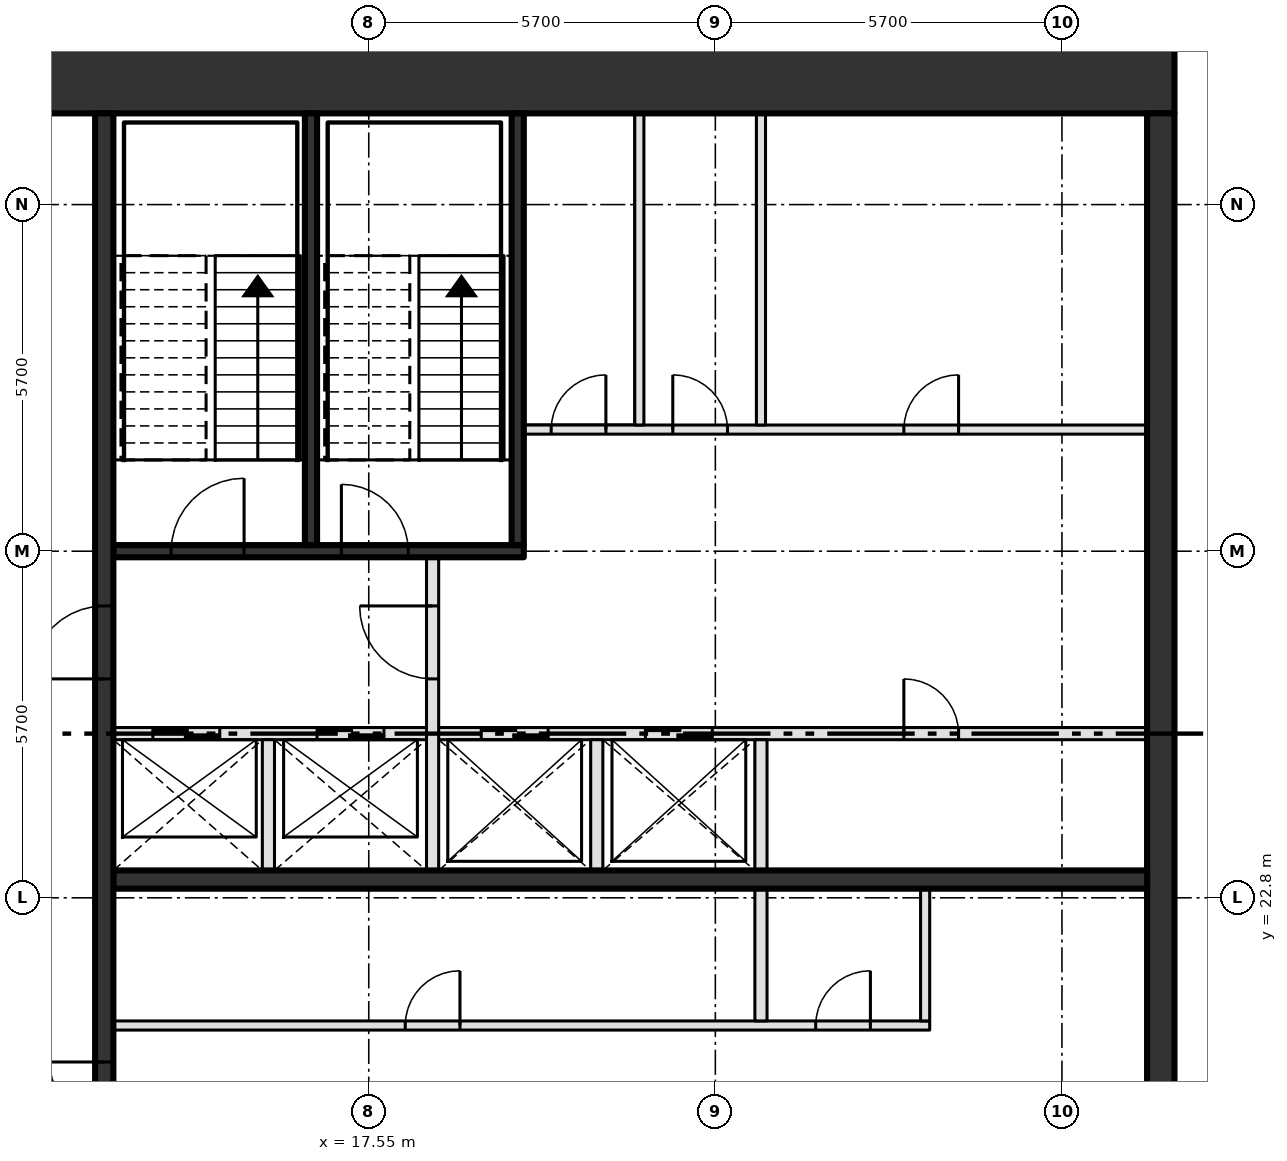
"""IFC4 building model, lengths in metres.
Left out: names, types, materials, properties, quantities, classifications, styles, units other than length and angle.
Written with IfcOpenShell. Run it as: python <this file> out.ifc"""

import sys

from ifc_helpers import new_model, si_unit, direction, frame, frame_2d, origin, place, context, subcontext, project, spatial, rectangle, extrude, element, fill, save


model = new_model("IFC4")
c1 = context("Model", 3, precision=1e-05, world=origin(), true_north=direction((0.0, 1.0)))
c2 = subcontext(c1, "Body", "Model", "MODEL_VIEW")
j1 = project(units=[si_unit("LENGTHUNIT", "METRE"), si_unit("PLANEANGLEUNIT", "RADIAN")], contexts=[c1])
p1 = place(None, origin())
s1 = spatial("IfcSite", under=j1, at=p1, CompositionType="ELEMENT")
p2 = place(p1, origin())
s2 = spatial("IfcBuilding", under=s1, at=p2, CompositionType="ELEMENT")
p3 = place(p2, frame((0.0, 0.0, 409.8)))
s3 = spatial("IfcBuildingStorey", under=s2, at=p3, CompositionType="ELEMENT", Elevation=409.8)
p4 = place(p3, frame((8.0, 36.3, -0.45), z_axis=(0.0, 0.0, 1.0), x_axis=(1.0, 0.0, 0.0)))
e1 = element("IfcWall", 1, at=p4, inside=s3, PredefinedType="SHEAR", context=c2, shape_type="SweptSolid", body=[
    extrude(rectangle(XDim=22.8, YDim=1.2, at=frame_2d((11.4, 0.0))), origin(), (0.0, 0.0, 1.0), 4.95),
])
p5 = place(p4, frame((2.3, 0.0, 0.45)))
e2 = element("IfcOpeningElement", 2, at=p5, cuts=e1, PredefinedType="OPENING", context=c2, shape_type="SweptSolid", body=[
    extrude(rectangle(XDim=1.8, YDim=2.1, at=frame_2d((0.9, 1.05))), frame((0.0, 0.61, 0.0), z_axis=(0.0, -1.0, 0.0), x_axis=(1.0, 0.0, 0.0)), (0.0, 0.0, 1.0), 1.22),
])
p6 = place(p3, frame((30.575, 14.55, -0.45), z_axis=(0.0, 0.0, 1.0), x_axis=(0.0, 1.0, 0.0)))
e3 = element("IfcWall", 3, at=p6, inside=s3, PredefinedType="SHEAR", context=c2, shape_type="SweptSolid", body=[
    extrude(rectangle(XDim=21.15, YDim=0.45, at=frame_2d((10.575, 0.0))), origin(), (0.0, 0.0, 1.0), 4.95),
])
p7 = place(p3, frame((13.35, 20.7, 0.0), z_axis=(0.0, 0.0, 1.0), x_axis=(1.0, 0.0, 0.0)))
e4 = element("IfcWall", 4, at=p7, inside=s3, PredefinedType="PARTITIONING", context=c2, shape_type="SweptSolid", body=[
    extrude(rectangle(XDim=13.425, YDim=0.15, at=frame_2d((6.712, 0.0))), origin(), (0.0, 0.0, 1.0), 4.5),
])
p8 = place(p7, frame((4.8, 0.0, 0.0)))
e5 = element("IfcOpeningElement", 5, at=p8, cuts=e4, PredefinedType="OPENING", context=c2, shape_type="SweptSolid", body=[
    extrude(rectangle(XDim=0.9, YDim=2.1, at=frame_2d((0.45, 1.05))), frame((0.0, 0.085, 0.0), z_axis=(0.0, -1.0, 0.0), x_axis=(1.0, 0.0, 0.0)), (0.0, 0.0, 1.0), 0.17),
])
p9 = place(p7, frame((11.55, 0.0, 0.0)))
e6 = element("IfcOpeningElement", 6, at=p9, cuts=e4, PredefinedType="OPENING", context=c2, shape_type="SweptSolid", body=[
    extrude(rectangle(XDim=0.9, YDim=2.1, at=frame_2d((0.45, 1.05))), frame((0.0, 0.085, 0.0), z_axis=(0.0, -1.0, 0.0), x_axis=(1.0, 0.0, 0.0)), (0.0, 0.0, 1.0), 0.17),
])
p10 = place(p3, frame((13.35, 23.1, 0.0), z_axis=(0.0, 0.0, 1.0), x_axis=(1.0, 0.0, 0.0)))
e7 = element("IfcWall", 7, at=p10, inside=s3, PredefinedType="SHEAR", context=c2, shape_type="SweptSolid", body=[
    extrude(rectangle(XDim=17.0, YDim=0.3, at=frame_2d((8.5, 0.0))), origin(), (0.0, 0.0, 1.0), 4.5),
])
p11 = place(p3, frame((13.35, 25.5, 0.0), z_axis=(0.0, 0.0, 1.0), x_axis=(1.0, 0.0, 0.0)))
e8 = element("IfcWall", 8, at=p11, inside=s3, PredefinedType="SOLIDWALL", context=c2, shape_type="SweptSolid", body=[
    extrude(rectangle(XDim=17.0, YDim=0.2, at=frame_2d((8.5, 0.0))), origin(), (0.0, 0.0, 1.0), 4.5),
])
p12 = place(p11, frame((0.65, 0.0, 0.0)))
e9 = element("IfcOpeningElement", 9, at=p12, cuts=e8, PredefinedType="OPENING", context=c2, shape_type="SweptSolid", body=[
    extrude(rectangle(XDim=1.1, YDim=2.1, at=frame_2d((0.55, 1.05))), frame((0.0, 0.11, 0.0), z_axis=(0.0, -1.0, 0.0), x_axis=(1.0, 0.0, 0.0)), (0.0, 0.0, 1.0), 0.22),
])
p13 = place(p11, frame((3.35, 0.0, 0.0)))
e10 = element("IfcOpeningElement", 10, at=p13, cuts=e8, PredefinedType="OPENING", context=c2, shape_type="SweptSolid", body=[
    extrude(rectangle(XDim=1.1, YDim=2.1, at=frame_2d((0.55, 1.05))), frame((0.0, 0.11, 0.0), z_axis=(0.0, -1.0, 0.0), x_axis=(1.0, 0.0, 0.0)), (0.0, 0.0, 1.0), 0.22),
])
p14 = place(p11, frame((6.05, 0.0, 0.0)))
e11 = element("IfcOpeningElement", 11, at=p14, cuts=e8, PredefinedType="OPENING", context=c2, shape_type="SweptSolid", body=[
    extrude(rectangle(XDim=1.1, YDim=2.1, at=frame_2d((0.55, 1.05))), frame((0.0, 0.11, 0.0), z_axis=(0.0, -1.0, 0.0), x_axis=(1.0, 0.0, 0.0)), (0.0, 0.0, 1.0), 0.22),
])
p15 = place(p11, frame((8.75, 0.0, 0.0)))
e12 = element("IfcOpeningElement", 12, at=p15, cuts=e8, PredefinedType="OPENING", context=c2, shape_type="SweptSolid", body=[
    extrude(rectangle(XDim=1.1, YDim=2.1, at=frame_2d((0.55, 1.05))), frame((0.0, 0.11, 0.0), z_axis=(0.0, -1.0, 0.0), x_axis=(1.0, 0.0, 0.0)), (0.0, 0.0, 1.0), 0.22),
])
p16 = place(p11, frame((13.0, 0.0, 0.0)))
e13 = element("IfcOpeningElement", 13, at=p16, cuts=e8, PredefinedType="OPENING", context=c2, shape_type="SweptSolid", body=[
    extrude(rectangle(XDim=0.9, YDim=2.1, at=frame_2d((0.45, 1.05))), frame((0.0, 0.11, 0.0), z_axis=(0.0, -1.0, 0.0), x_axis=(1.0, 0.0, 0.0)), (0.0, 0.0, 1.0), 0.22),
])
p17 = place(p3, frame((13.35, 28.5, 0.0), z_axis=(0.0, 0.0, 1.0), x_axis=(1.0, 0.0, 0.0)))
e14 = element("IfcWall", 14, at=p17, inside=s3, PredefinedType="SOLIDWALL", context=c2, shape_type="SweptSolid", body=[
    extrude(rectangle(XDim=6.75, YDim=0.2, at=frame_2d((3.375, 0.0))), origin(), (0.0, 0.0, 1.0), 4.5),
])
p18 = place(p17, frame((0.95, 0.0, 0.0)))
e15 = element("IfcOpeningElement", 15, at=p18, cuts=e14, PredefinedType="OPENING", context=c2, shape_type="SweptSolid", body=[
    extrude(rectangle(XDim=1.2, YDim=2.1, at=frame_2d((0.6, 1.05))), frame((0.0, 0.11, 0.0), z_axis=(0.0, -1.0, 0.0), x_axis=(1.0, 0.0, 0.0)), (0.0, 0.0, 1.0), 0.22),
])
p19 = place(p17, frame((3.75, 0.0, 0.0)))
e16 = element("IfcOpeningElement", 16, at=p19, cuts=e14, PredefinedType="OPENING", context=c2, shape_type="SweptSolid", body=[
    extrude(rectangle(XDim=1.1, YDim=2.1, at=frame_2d((0.55, 1.05))), frame((0.0, 0.11, 0.0), z_axis=(0.0, -1.0, 0.0), x_axis=(1.0, 0.0, 0.0)), (0.0, 0.0, 1.0), 0.22),
])
p20 = place(p3, frame((20.1, 30.5, 0.0), z_axis=(0.0, 0.0, 1.0), x_axis=(1.0, 0.0, 0.0)))
e17 = element("IfcWall", 17, at=p20, inside=s3, PredefinedType="PARTITIONING", context=c2, shape_type="SweptSolid", body=[
    extrude(rectangle(XDim=10.25, YDim=0.15, at=frame_2d((5.125, 0.0))), origin(), (0.0, 0.0, 1.0), 4.5),
])
p21 = place(p20, frame((0.45, 0.0, 0.0)))
e18 = element("IfcOpeningElement", 18, at=p21, cuts=e17, PredefinedType="OPENING", context=c2, shape_type="SweptSolid", body=[
    extrude(rectangle(XDim=0.9, YDim=2.1, at=frame_2d((0.45, 1.05))), frame((0.0, 0.085, 0.0), z_axis=(0.0, -1.0, 0.0), x_axis=(1.0, 0.0, 0.0)), (0.0, 0.0, 1.0), 0.17),
])
p22 = place(p20, frame((2.45, 0.0, 0.0)))
e19 = element("IfcOpeningElement", 19, at=p22, cuts=e17, PredefinedType="OPENING", context=c2, shape_type="SweptSolid", body=[
    extrude(rectangle(XDim=0.9, YDim=2.1, at=frame_2d((0.45, 1.05))), frame((0.0, 0.085, 0.0), z_axis=(0.0, -1.0, 0.0), x_axis=(1.0, 0.0, 0.0)), (0.0, 0.0, 1.0), 0.17),
])
p23 = place(p20, frame((6.25, 0.0, 0.0)))
e20 = element("IfcOpeningElement", 20, at=p23, cuts=e17, PredefinedType="OPENING", context=c2, shape_type="SweptSolid", body=[
    extrude(rectangle(XDim=0.9, YDim=2.1, at=frame_2d((0.45, 1.05))), frame((0.0, 0.085, 0.0), z_axis=(0.0, -1.0, 0.0), x_axis=(1.0, 0.0, 0.0)), (0.0, 0.0, 1.0), 0.17),
])
p24 = place(p3, frame((13.2, 14.55, 0.0), z_axis=(0.0, 0.0, 1.0), x_axis=(0.0, 1.0, 0.0)))
e21 = element("IfcWall", 21, at=p24, inside=s3, PredefinedType="SHEAR", context=c2, shape_type="SweptSolid", body=[
    extrude(rectangle(XDim=21.15, YDim=0.3, at=frame_2d((10.575, 0.0))), origin(), (0.0, 0.0, 1.0), 4.5),
])
p25 = place(p24, frame((3.75, 0.0, 0.0)))
e22 = element("IfcOpeningElement", 22, at=p25, cuts=e21, PredefinedType="OPENING", context=c2, shape_type="SweptSolid", body=[
    extrude(rectangle(XDim=1.8, YDim=2.1, at=frame_2d((0.9, 1.05))), frame((0.0, 0.16, 0.0), z_axis=(0.0, -1.0, 0.0), x_axis=(1.0, 0.0, 0.0)), (0.0, 0.0, 1.0), 0.32),
])
p26 = place(p24, frame((11.85, 0.0, 0.0)))
e23 = element("IfcOpeningElement", 23, at=p26, cuts=e21, PredefinedType="OPENING", context=c2, shape_type="SweptSolid", body=[
    extrude(rectangle(XDim=1.2, YDim=2.1, at=frame_2d((0.6, 1.05))), frame((0.0, 0.16, 0.0), z_axis=(0.0, -1.0, 0.0), x_axis=(1.0, 0.0, 0.0)), (0.0, 0.0, 1.0), 0.32),
])
p27 = place(p3, frame((15.9, 23.25, 0.0), z_axis=(0.0, 0.0, 1.0), x_axis=(0.0, 1.0, 0.0)))
e24 = element("IfcWall", 24, at=p27, inside=s3, PredefinedType="SOLIDWALL", context=c2, shape_type="SweptSolid", body=[
    extrude(rectangle(XDim=2.15, YDim=0.2, at=frame_2d((1.075, 0.0))), origin(), (0.0, 0.0, 1.0), 4.5),
])
p28 = place(p3, frame((16.6, 28.6, 0.0), z_axis=(0.0, 0.0, 1.0), x_axis=(0.0, 1.0, 0.0)))
e25 = element("IfcWall", 25, at=p28, inside=s3, PredefinedType="SOLIDWALL", context=c2, shape_type="SweptSolid", body=[
    extrude(rectangle(XDim=7.1, YDim=0.2, at=frame_2d((3.55, 0.0))), origin(), (0.0, 0.0, 1.0), 4.5),
])
p29 = place(p3, frame((18.6, 23.25, 0.0), z_axis=(0.0, 0.0, 1.0), x_axis=(0.0, 1.0, 0.0)))
e26 = element("IfcWall", 26, at=p29, inside=s3, PredefinedType="SOLIDWALL", context=c2, shape_type="SweptSolid", body=[
    extrude(rectangle(XDim=5.15, YDim=0.2, at=frame_2d((2.575, 0.0))), origin(), (0.0, 0.0, 1.0), 4.5),
])
p30 = place(p29, frame((3.15, 0.0, 0.0)))
e27 = element("IfcOpeningElement", 27, at=p30, cuts=e26, PredefinedType="OPENING", context=c2, shape_type="SweptSolid", body=[
    extrude(rectangle(XDim=1.2, YDim=2.1, at=frame_2d((0.6, 1.05))), frame((0.0, 0.11, 0.0), z_axis=(0.0, -1.0, 0.0), x_axis=(1.0, 0.0, 0.0)), (0.0, 0.0, 1.0), 0.22),
])
p31 = place(p3, frame((20.0, 28.6, 0.0), z_axis=(0.0, 0.0, 1.0), x_axis=(0.0, 1.0, 0.0)))
e28 = element("IfcWall", 28, at=p31, inside=s3, PredefinedType="SOLIDWALL", context=c2, shape_type="SweptSolid", body=[
    extrude(rectangle(XDim=7.1, YDim=0.2, at=frame_2d((3.55, 0.0))), origin(), (0.0, 0.0, 1.0), 4.5),
])
p32 = place(p3, frame((21.3, 23.25, 0.0), z_axis=(0.0, 0.0, 1.0), x_axis=(0.0, 1.0, 0.0)))
e29 = element("IfcWall", 29, at=p32, inside=s3, PredefinedType="SOLIDWALL", context=c2, shape_type="SweptSolid", body=[
    extrude(rectangle(XDim=2.15, YDim=0.2, at=frame_2d((1.075, 0.0))), origin(), (0.0, 0.0, 1.0), 4.5),
])
p33 = place(p3, frame((22.0, 30.575, 0.0), z_axis=(0.0, 0.0, 1.0), x_axis=(0.0, 1.0, 0.0)))
e30 = element("IfcWall", 30, at=p33, inside=s3, PredefinedType="PARTITIONING", context=c2, shape_type="SweptSolid", body=[
    extrude(rectangle(XDim=5.125, YDim=0.15, at=frame_2d((2.562, 0.0))), origin(), (0.0, 0.0, 1.0), 4.5),
])
p34 = place(p3, frame((24.0, 20.775, 0.0), z_axis=(0.0, 0.0, 1.0), x_axis=(0.0, 1.0, 0.0)))
e31 = element("IfcWall", 31, at=p34, inside=s3, PredefinedType="SOLIDWALL", context=c2, shape_type="SweptSolid", body=[
    extrude(rectangle(XDim=4.625, YDim=0.2, at=frame_2d((2.312, 0.0))), origin(), (0.0, 0.0, 1.0), 4.5),
])
p35 = place(p3, frame((24.0, 30.575, 0.0), z_axis=(0.0, 0.0, 1.0), x_axis=(0.0, 1.0, 0.0)))
e32 = element("IfcWall", 32, at=p35, inside=s3, PredefinedType="PARTITIONING", context=c2, shape_type="SweptSolid", body=[
    extrude(rectangle(XDim=5.125, YDim=0.15, at=frame_2d((2.562, 0.0))), origin(), (0.0, 0.0, 1.0), 4.5),
])
p36 = place(p3, frame((26.7, 20.775, 0.0), z_axis=(0.0, 0.0, 1.0), x_axis=(0.0, 1.0, 0.0)))
e33 = element("IfcWall", 33, at=p36, inside=s3, PredefinedType="PARTITIONING", context=c2, shape_type="SweptSolid", body=[
    extrude(rectangle(XDim=2.175, YDim=0.15, at=frame_2d((1.087, 0.0))), origin(), (0.0, 0.0, 1.0), 4.5),
])
p37 = place(p12, origin())
e34 = element("IfcDoor", 34, at=p37, inside=s3, OperationType="SLIDING_TO_LEFT", PredefinedType="DOOR", context=c2, shape_type="SweptSolid", body=[
    extrude(rectangle(XDim=1.1, YDim=2.1, at=frame_2d((0.55, 1.05))), frame((0.0, 0.025, 0.0), z_axis=(0.0, -1.0, 0.0), x_axis=(1.0, 0.0, 0.0)), (0.0, 0.0, 1.0), 0.05),
])
fill(e9, e34)
p38 = place(p13, origin())
e35 = element("IfcDoor", 35, at=p38, inside=s3, OperationType="SLIDING_TO_LEFT", PredefinedType="DOOR", context=c2, shape_type="SweptSolid", body=[
    extrude(rectangle(XDim=1.1, YDim=2.1, at=frame_2d((0.55, 1.05))), frame((0.0, 0.025, 0.0), z_axis=(0.0, -1.0, 0.0), x_axis=(1.0, 0.0, 0.0)), (0.0, 0.0, 1.0), 0.05),
])
fill(e10, e35)
p39 = place(p14, origin())
e36 = element("IfcDoor", 36, at=p39, inside=s3, OperationType="SLIDING_TO_LEFT", PredefinedType="DOOR", context=c2, shape_type="SweptSolid", body=[
    extrude(rectangle(XDim=1.1, YDim=2.1, at=frame_2d((0.55, 1.05))), frame((0.0, 0.025, 0.0), z_axis=(0.0, -1.0, 0.0), x_axis=(1.0, 0.0, 0.0)), (0.0, 0.0, 1.0), 0.05),
])
fill(e11, e36)
p40 = place(p15, origin())
e37 = element("IfcDoor", 37, at=p40, inside=s3, OperationType="SLIDING_TO_LEFT", PredefinedType="DOOR", context=c2, shape_type="SweptSolid", body=[
    extrude(rectangle(XDim=1.1, YDim=2.1, at=frame_2d((0.55, 1.05))), frame((0.0, 0.025, 0.0), z_axis=(0.0, -1.0, 0.0), x_axis=(1.0, 0.0, 0.0)), (0.0, 0.0, 1.0), 0.05),
])
fill(e12, e37)
p41 = place(p8, origin())
e38 = element("IfcDoor", 38, at=p41, inside=s3, OperationType="SINGLE_SWING_RIGHT", PredefinedType="DOOR", context=c2, shape_type="SweptSolid", body=[
    extrude(rectangle(XDim=0.9, YDim=2.1, at=frame_2d((0.45, 1.05))), frame((0.0, 0.025, 0.0), z_axis=(0.0, -1.0, 0.0), x_axis=(1.0, 0.0, 0.0)), (0.0, 0.0, 1.0), 0.05),
])
fill(e5, e38)
p42 = place(p9, origin())
e39 = element("IfcDoor", 39, at=p42, inside=s3, OperationType="SINGLE_SWING_RIGHT", PredefinedType="DOOR", context=c2, shape_type="SweptSolid", body=[
    extrude(rectangle(XDim=0.9, YDim=2.1, at=frame_2d((0.45, 1.05))), frame((0.0, 0.025, 0.0), z_axis=(0.0, -1.0, 0.0), x_axis=(1.0, 0.0, 0.0)), (0.0, 0.0, 1.0), 0.05),
])
fill(e6, e39)
p43 = place(p16, origin())
e40 = element("IfcDoor", 40, at=p43, inside=s3, OperationType="SINGLE_SWING_LEFT", PredefinedType="DOOR", context=c2, shape_type="SweptSolid", body=[
    extrude(rectangle(XDim=0.9, YDim=2.1, at=frame_2d((0.45, 1.05))), frame((0.0, 0.025, 0.0), z_axis=(0.0, -1.0, 0.0), x_axis=(1.0, 0.0, 0.0)), (0.0, 0.0, 1.0), 0.05),
])
fill(e13, e40)
p44 = place(p21, origin())
e41 = element("IfcDoor", 41, at=p44, inside=s3, OperationType="SINGLE_SWING_RIGHT", PredefinedType="DOOR", context=c2, shape_type="SweptSolid", body=[
    extrude(rectangle(XDim=0.9, YDim=2.1, at=frame_2d((0.45, 1.05))), frame((0.0, 0.025, 0.0), z_axis=(0.0, -1.0, 0.0), x_axis=(1.0, 0.0, 0.0)), (0.0, 0.0, 1.0), 0.05),
])
fill(e18, e41)
p45 = place(p22, origin())
e42 = element("IfcDoor", 42, at=p45, inside=s3, OperationType="SINGLE_SWING_LEFT", PredefinedType="DOOR", context=c2, shape_type="SweptSolid", body=[
    extrude(rectangle(XDim=0.9, YDim=2.1, at=frame_2d((0.45, 1.05))), frame((0.0, 0.025, 0.0), z_axis=(0.0, -1.0, 0.0), x_axis=(1.0, 0.0, 0.0)), (0.0, 0.0, 1.0), 0.05),
])
fill(e19, e42)
p46 = place(p23, origin())
e43 = element("IfcDoor", 43, at=p46, inside=s3, OperationType="SINGLE_SWING_RIGHT", PredefinedType="DOOR", context=c2, shape_type="SweptSolid", body=[
    extrude(rectangle(XDim=0.9, YDim=2.1, at=frame_2d((0.45, 1.05))), frame((0.0, 0.025, 0.0), z_axis=(0.0, -1.0, 0.0), x_axis=(1.0, 0.0, 0.0)), (0.0, 0.0, 1.0), 0.05),
])
fill(e20, e43)
p47 = place(p18, origin())
e44 = element("IfcDoor", 44, at=p47, inside=s3, OperationType="SINGLE_SWING_RIGHT", PredefinedType="DOOR", context=c2, shape_type="SweptSolid", body=[
    extrude(rectangle(XDim=1.2, YDim=2.1, at=frame_2d((0.6, 1.05))), frame((0.0, 0.025, 0.0), z_axis=(0.0, -1.0, 0.0), x_axis=(1.0, 0.0, 0.0)), (0.0, 0.0, 1.0), 0.05),
])
fill(e15, e44)
p48 = place(p19, origin())
e45 = element("IfcDoor", 45, at=p48, inside=s3, OperationType="SINGLE_SWING_LEFT", PredefinedType="DOOR", context=c2, shape_type="SweptSolid", body=[
    extrude(rectangle(XDim=1.1, YDim=2.1, at=frame_2d((0.55, 1.05))), frame((0.0, 0.025, 0.0), z_axis=(0.0, -1.0, 0.0), x_axis=(1.0, 0.0, 0.0)), (0.0, 0.0, 1.0), 0.05),
])
fill(e16, e45)
p49 = place(p25, origin())
e46 = element("IfcDoor", 46, at=p49, inside=s3, OperationType="DOUBLE_DOOR_SINGLE_SWING", PredefinedType="DOOR", context=c2, shape_type="SweptSolid", body=[
    extrude(rectangle(XDim=1.8, YDim=2.1, at=frame_2d((0.9, 1.05))), frame((0.0, 0.025, 0.0), z_axis=(0.0, -1.0, 0.0), x_axis=(1.0, 0.0, 0.0)), (0.0, 0.0, 1.0), 0.05),
])
fill(e22, e46)
p50 = place(p26, origin())
e47 = element("IfcDoor", 47, at=p50, inside=s3, OperationType="SINGLE_SWING_LEFT", PredefinedType="DOOR", context=c2, shape_type="SweptSolid", body=[
    extrude(rectangle(XDim=1.2, YDim=2.1, at=frame_2d((0.6, 1.05))), frame((0.0, 0.025, 0.0), z_axis=(0.0, -1.0, 0.0), x_axis=(1.0, 0.0, 0.0)), (0.0, 0.0, 1.0), 0.05),
])
fill(e23, e47)
p51 = place(p30, origin())
e48 = element("IfcDoor", 48, at=p51, inside=s3, OperationType="SINGLE_SWING_RIGHT", PredefinedType="DOOR", context=c2, shape_type="SweptSolid", body=[
    extrude(rectangle(XDim=1.2, YDim=2.1, at=frame_2d((0.6, 1.05))), frame((0.0, 0.025, 0.0), z_axis=(0.0, -1.0, 0.0), x_axis=(1.0, 0.0, 0.0)), (0.0, 0.0, 1.0), 0.05),
])
fill(e27, e48)
save(model, sys.argv[1])
